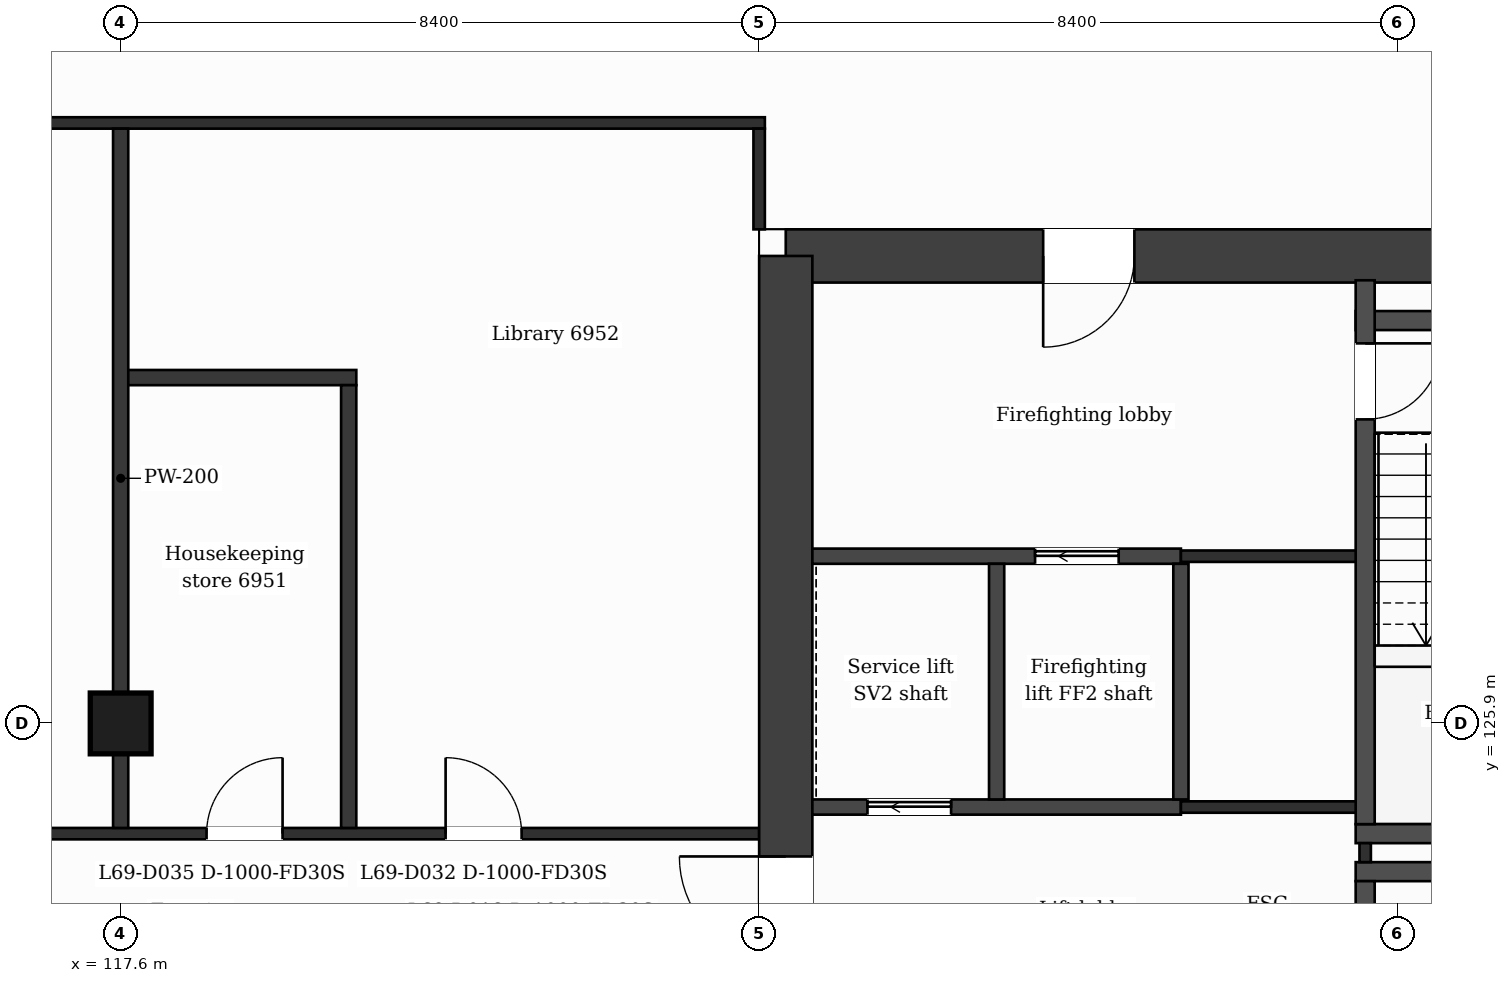
"""IFC4 building model, lengths in metres.
Left out: names, types, materials, properties, quantities, classifications, styles, units other than length and angle.
Written with IfcOpenShell. Run it as: python <this file> out.ifc"""

import sys

from ifc_helpers import new_model, si_unit, direction, frame, frame_2d, origin, origin_2d, place, context, subcontext, project, spatial, rectangle, extrude, element, fill, save


model = new_model("IFC4")
c1 = context("Model", 3, precision=1e-05, world=origin(), true_north=direction((0.0, 1.0)))
c2 = subcontext(c1, "Body", "Model", "MODEL_VIEW")
j1 = project(units=[si_unit("LENGTHUNIT", "METRE"), si_unit("PLANEANGLEUNIT", "RADIAN")], contexts=[c1])
p1 = place(None, origin())
s1 = spatial("IfcSite", under=j1, at=p1, CompositionType="ELEMENT")
p2 = place(p1, origin())
s2 = spatial("IfcBuilding", under=s1, at=p2, CompositionType="ELEMENT")
p3 = place(p2, frame((0.0, 0.0, 284.9)))
s3 = spatial("IfcBuildingStorey", under=s2, at=p3, CompositionType="ELEMENT", Elevation=284.9)
p4 = place(p3, frame((126.35, 132.05, 0.0), z_axis=(0.0, 0.0, 1.0), x_axis=(1.0, 0.0, 0.0)))
e1 = element("IfcWall", 1, at=p4, inside=s3, PredefinedType="SHEAR", context=c2, shape_type="SweptSolid", body=[
    extrude(rectangle(XDim=11.513, YDim=0.7, at=frame_2d((5.757, 0.0))), origin(), (0.0, 0.0, 1.0), 3.7),
])
p5 = place(p4, frame((3.386, 0.0, 0.0)))
e2 = element("IfcOpeningElement", 2, at=p5, cuts=e1, PredefinedType="OPENING", context=c2, shape_type="SweptSolid", body=[
    extrude(rectangle(XDim=1.2, YDim=2.1, at=frame_2d((0.6, 1.05))), frame((0.0, 0.36, 0.0), z_axis=(0.0, -1.0, 0.0), x_axis=(1.0, 0.0, 0.0)), (0.0, 0.0, 1.0), 0.72),
])
p6 = place(p3, frame((126.35, 116.35, 0.0), z_axis=(0.0, 0.0, 1.0), x_axis=(0.0, 1.0, 0.0)))
e3 = element("IfcWall", 3, at=p6, inside=s3, PredefinedType="SHEAR", context=c2, shape_type="SweptSolid", body=[
    extrude(rectangle(XDim=15.7, YDim=0.7, at=frame_2d((7.85, 0.0))), origin(), (0.0, 0.0, 1.0), 3.7),
])
p7 = place(p6, frame((6.4, 0.0, 0.0)))
e4 = element("IfcOpeningElement", 4, at=p7, cuts=e3, PredefinedType="OPENING", context=c2, shape_type="SweptSolid", body=[
    extrude(rectangle(XDim=1.4, YDim=2.1, at=frame_2d((0.7, 1.05))), frame((0.0, 0.36, 0.0), z_axis=(0.0, -1.0, 0.0), x_axis=(1.0, 0.0, 0.0)), (0.0, 0.0, 1.0), 0.72),
])
p8 = place(p3, frame((117.6, 125.9, 0.0), z_axis=(0.0, 0.0, 1.0), x_axis=(1.0, 0.0, 0.0)))
e5 = element("IfcColumn", 5, at=p8, inside=s3, PredefinedType="COLUMN", context=c2, shape_type="SweptSolid", body=[
    extrude(rectangle(XDim=0.8, YDim=0.8, at=origin_2d()), origin(), (0.0, 0.0, 1.0), 3.7),
])
for number, where, z_axis, x_axis in (
    (6, (133.848, 123.95, 0.0), (0.0, 0.0, 1.0), (1.0, 0.0, 0.0)),
    (7, (133.848, 124.45, 0.0), (0.0, 0.0, 1.0), (1.0, 0.0, 0.0)),
):
    element("IfcWall", number, at=place(p3, frame(where, z_axis=z_axis, x_axis=x_axis)), inside=s3, PredefinedType="PARTITIONING", context=c2, shape_type="SweptSolid", body=[
        extrude(rectangle(XDim=3.4, YDim=0.25, at=frame_2d((1.7, 0.0))), origin(), (0.0, 0.0, 1.0), 3.38),
    ])
p9 = place(p3, frame((100.8, 124.45, 0.0), z_axis=(0.0, 0.0, 1.0), x_axis=(1.0, 0.0, 0.0)))
e8 = element("IfcWall", 8, at=p9, inside=s3, PredefinedType="PARTITIONING", context=c2, shape_type="SweptSolid", body=[
    extrude(rectangle(XDim=25.2, YDim=0.15, at=frame_2d((12.6, 0.0))), origin(), (0.0, 0.0, 1.0), 3.38),
])
p10 = place(p9, frame((21.075, 0.0, 0.0)))
e9 = element("IfcOpeningElement", 9, at=p10, cuts=e8, PredefinedType="OPENING", context=c2, shape_type="SweptSolid", body=[
    extrude(rectangle(XDim=1.0, YDim=2.1, at=frame_2d((0.5, 1.05))), frame((0.0, 0.085, 0.0), z_axis=(0.0, -1.0, 0.0), x_axis=(1.0, 0.0, 0.0)), (0.0, 0.0, 1.0), 0.17),
])
p11 = place(p9, frame((5.375, 0.0, 0.0)))
e10 = element("IfcOpeningElement", 10, at=p11, cuts=e8, PredefinedType="OPENING", context=c2, shape_type="SweptSolid", body=[
    extrude(rectangle(XDim=1.0, YDim=2.1, at=frame_2d((0.5, 1.05))), frame((0.0, 0.085, 0.0), z_axis=(0.0, -1.0, 0.0), x_axis=(1.0, 0.0, 0.0)), (0.0, 0.0, 1.0), 0.17),
])
p12 = place(p9, frame((12.1, 0.0, 0.0)))
e11 = element("IfcOpeningElement", 11, at=p12, cuts=e8, PredefinedType="OPENING", context=c2, shape_type="SweptSolid", body=[
    extrude(rectangle(XDim=1.0, YDim=2.1, at=frame_2d((0.5, 1.05))), frame((0.0, 0.085, 0.0), z_axis=(0.0, -1.0, 0.0), x_axis=(1.0, 0.0, 0.0)), (0.0, 0.0, 1.0), 0.17),
])
p13 = place(p9, frame((17.93, 0.0, 0.0)))
e12 = element("IfcOpeningElement", 12, at=p13, cuts=e8, PredefinedType="OPENING", context=c2, shape_type="SweptSolid", body=[
    extrude(rectangle(XDim=1.0, YDim=2.1, at=frame_2d((0.5, 1.05))), frame((0.0, 0.085, 0.0), z_axis=(0.0, -1.0, 0.0), x_axis=(1.0, 0.0, 0.0)), (0.0, 0.0, 1.0), 0.17),
])
p14 = place(p3, frame((126.7, 124.8, 0.0), z_axis=(0.0, 0.0, 1.0), x_axis=(1.0, 0.0, 0.0)))
e13 = element("IfcWall", 13, at=p14, inside=s3, PredefinedType="PARTITIONING", context=c2, shape_type="SweptSolid", body=[
    extrude(rectangle(XDim=4.849, YDim=0.2, at=frame_2d((2.424, 0.0))), origin(), (0.0, 0.0, 1.0), 3.38),
])
p15 = place(p14, frame((0.725, 0.0, 0.0)))
e14 = element("IfcOpeningElement", 14, at=p15, cuts=e13, PredefinedType="OPENING", context=c2, shape_type="SweptSolid", body=[
    extrude(rectangle(XDim=1.1, YDim=2.1, at=frame_2d((0.55, 1.05))), frame((0.0, 0.11, 0.0), z_axis=(0.0, -1.0, 0.0), x_axis=(1.0, 0.0, 0.0)), (0.0, 0.0, 1.0), 0.22),
])
p16 = place(p3, frame((131.549, 124.8, 0.0), z_axis=(0.0, 0.0, 1.0), x_axis=(1.0, 0.0, 0.0)))
e15 = element("IfcWall", 15, at=p16, inside=s3, PredefinedType="PARTITIONING", context=c2, shape_type="SweptSolid", body=[
    extrude(rectangle(XDim=2.549, YDim=0.15, at=frame_2d((1.275, 0.0))), origin(), (0.0, 0.0, 1.0), 3.38),
])
p17 = place(p3, frame((126.7, 128.1, 0.0), z_axis=(0.0, 0.0, 1.0), x_axis=(1.0, 0.0, 0.0)))
e16 = element("IfcWall", 16, at=p17, inside=s3, PredefinedType="PARTITIONING", context=c2, shape_type="SweptSolid", body=[
    extrude(rectangle(XDim=4.849, YDim=0.2, at=frame_2d((2.424, 0.0))), origin(), (0.0, 0.0, 1.0), 3.38),
])
p18 = place(p17, frame((2.93, 0.0, 0.0)))
e17 = element("IfcOpeningElement", 17, at=p18, cuts=e16, PredefinedType="OPENING", context=c2, shape_type="SweptSolid", body=[
    extrude(rectangle(XDim=1.1, YDim=2.1, at=frame_2d((0.55, 1.05))), frame((0.0, 0.11, 0.0), z_axis=(0.0, -1.0, 0.0), x_axis=(1.0, 0.0, 0.0)), (0.0, 0.0, 1.0), 0.22),
])
p19 = place(p3, frame((131.549, 128.1, 0.0), z_axis=(0.0, 0.0, 1.0), x_axis=(1.0, 0.0, 0.0)))
e18 = element("IfcWall", 18, at=p19, inside=s3, PredefinedType="PARTITIONING", context=c2, shape_type="SweptSolid", body=[
    extrude(rectangle(XDim=2.424, YDim=0.15, at=frame_2d((1.212, 0.0))), origin(), (0.0, 0.0, 1.0), 3.38),
])
p20 = place(p3, frame((117.6, 130.45, 0.0), z_axis=(0.0, 0.0, 1.0), x_axis=(1.0, 0.0, 0.0)))
e19 = element("IfcWall", 19, at=p20, inside=s3, PredefinedType="PARTITIONING", context=c2, shape_type="SweptSolid", body=[
    extrude(rectangle(XDim=3.1, YDim=0.2, at=frame_2d((1.55, 0.0))), origin(), (0.0, 0.0, 1.0), 3.38),
])
p21 = place(p3, frame((133.848, 131.2, 0.0), z_axis=(0.0, 0.0, 1.0), x_axis=(1.0, 0.0, 0.0)))
e20 = element("IfcWall", 20, at=p21, inside=s3, PredefinedType="PARTITIONING", context=c2, shape_type="SweptSolid", body=[
    extrude(rectangle(XDim=3.807, YDim=0.25, at=frame_2d((1.903, 0.0))), origin(), (0.0, 0.0, 1.0), 3.38),
])
p22 = place(p3, frame((100.725, 133.8, 0.0), z_axis=(0.0, 0.0, 1.0), x_axis=(1.0, 0.0, 0.0)))
e21 = element("IfcWall", 21, at=p22, inside=s3, PredefinedType="PARTITIONING", context=c2, shape_type="SweptSolid", body=[
    extrude(rectangle(XDim=25.35, YDim=0.15, at=frame_2d((12.675, 0.0))), origin(), (0.0, 0.0, 1.0), 3.38),
])
p23 = place(p3, frame((117.6, 124.525, 0.0), z_axis=(0.0, 0.0, 1.0), x_axis=(0.0, 1.0, 0.0)))
e22 = element("IfcWall", 22, at=p23, inside=s3, PredefinedType="PARTITIONING", context=c2, shape_type="SweptSolid", body=[
    extrude(rectangle(XDim=9.2, YDim=0.2, at=frame_2d((4.6, 0.0))), origin(), (0.0, 0.0, 1.0), 3.38),
])
p24 = place(p3, frame((120.6, 124.525, 0.0), z_axis=(0.0, 0.0, 1.0), x_axis=(0.0, 1.0, 0.0)))
e23 = element("IfcWall", 23, at=p24, inside=s3, PredefinedType="PARTITIONING", context=c2, shape_type="SweptSolid", body=[
    extrude(rectangle(XDim=5.825, YDim=0.2, at=frame_2d((2.913, 0.0))), origin(), (0.0, 0.0, 1.0), 3.38),
])
p25 = place(p3, frame((126.0, 132.4, 0.0), z_axis=(0.0, 0.0, 1.0), x_axis=(0.0, 1.0, 0.0)))
e24 = element("IfcWall", 24, at=p25, inside=s3, PredefinedType="PARTITIONING", context=c2, shape_type="SweptSolid", body=[
    extrude(rectangle(XDim=1.325, YDim=0.15, at=frame_2d((0.663, 0.0))), origin(), (0.0, 0.0, 1.0), 3.38),
])
for number, where, z_axis, x_axis in (
    (25, (129.124, 124.9, 0.0), (0.0, 0.0, 1.0), (0.0, 1.0, 0.0)),
    (26, (131.549, 124.9, 0.0), (0.0, 0.0, 1.0), (0.0, 1.0, 0.0)),
):
    element("IfcWall", number, at=place(p3, frame(where, z_axis=z_axis, x_axis=x_axis)), inside=s3, PredefinedType="PARTITIONING", context=c2, shape_type="SweptSolid", body=[
        extrude(rectangle(XDim=3.1, YDim=0.2, at=frame_2d((1.55, 0.0))), origin(), (0.0, 0.0, 1.0), 3.38),
    ])
p26 = place(p3, frame((133.973, 124.075, 0.0), z_axis=(0.0, 0.0, 1.0), x_axis=(0.0, 1.0, 0.0)))
e27 = element("IfcWall", 27, at=p26, inside=s3, PredefinedType="PARTITIONING", context=c2, shape_type="SweptSolid", body=[
    extrude(rectangle(XDim=0.25, YDim=0.15, at=frame_2d((0.125, 0.0))), origin(), (0.0, 0.0, 1.0), 3.38),
])
p27 = place(p3, frame((133.973, 116.67, 0.0), z_axis=(0.0, 0.0, 1.0), x_axis=(0.0, 1.0, 0.0)))
e28 = element("IfcWall", 28, at=p27, inside=s3, PredefinedType="PARTITIONING", context=c2, shape_type="SweptSolid", body=[
    extrude(rectangle(XDim=7.155, YDim=0.25, at=frame_2d((3.578, 0.0))), origin(), (0.0, 0.0, 1.0), 3.38),
])
p28 = place(p27, frame((5.855, 0.0, 0.0)))
e29 = element("IfcOpeningElement", 29, at=p28, cuts=e28, PredefinedType="OPENING", context=c2, shape_type="SweptSolid", body=[
    extrude(rectangle(XDim=0.95, YDim=2.1, at=frame_2d((0.475, 1.05))), frame((0.0, 0.135, 0.0), z_axis=(0.0, -1.0, 0.0), x_axis=(1.0, 0.0, 0.0)), (0.0, 0.0, 1.0), 0.27),
])
p29 = place(p3, frame((133.973, 124.575, 0.0), z_axis=(0.0, 0.0, 1.0), x_axis=(0.0, 1.0, 0.0)))
e30 = element("IfcWall", 30, at=p29, inside=s3, PredefinedType="PARTITIONING", context=c2, shape_type="SweptSolid", body=[
    extrude(rectangle(XDim=7.155, YDim=0.25, at=frame_2d((3.578, 0.0))), origin(), (0.0, 0.0, 1.0), 3.38),
])
p30 = place(p29, frame((5.325, 0.0, 0.0)))
e31 = element("IfcOpeningElement", 31, at=p30, cuts=e30, PredefinedType="OPENING", context=c2, shape_type="SweptSolid", body=[
    extrude(rectangle(XDim=1.0, YDim=2.1, at=frame_2d((0.5, 1.05))), frame((0.0, 0.135, 0.0), z_axis=(0.0, -1.0, 0.0), x_axis=(1.0, 0.0, 0.0)), (0.0, 0.0, 1.0), 0.27),
])
p31 = place(p18, origin())
e32 = element("IfcDoor", 32, at=p31, inside=s3, OperationType="SLIDING_TO_LEFT", PredefinedType="DOOR", context=c2, shape_type="SweptSolid", body=[
    extrude(rectangle(XDim=1.1, YDim=2.1, at=frame_2d((0.55, 1.05))), frame((0.0, 0.025, 0.0), z_axis=(0.0, -1.0, 0.0), x_axis=(1.0, 0.0, 0.0)), (0.0, 0.0, 1.0), 0.05),
])
fill(e17, e32)
p32 = place(p15, origin())
e33 = element("IfcDoor", 33, at=p32, inside=s3, OperationType="SLIDING_TO_LEFT", PredefinedType="DOOR", context=c2, shape_type="SweptSolid", body=[
    extrude(rectangle(XDim=1.1, YDim=2.1, at=frame_2d((0.55, 1.05))), frame((0.0, 0.025, 0.0), z_axis=(0.0, -1.0, 0.0), x_axis=(1.0, 0.0, 0.0)), (0.0, 0.0, 1.0), 0.05),
])
fill(e14, e33)
p33 = place(p30, origin())
e34 = element("IfcDoor", 34, at=p33, inside=s3, OperationType="SINGLE_SWING_RIGHT", PredefinedType="DOOR", context=c2, shape_type="SweptSolid", body=[
    extrude(rectangle(XDim=1.0, YDim=2.1, at=frame_2d((0.5, 1.05))), frame((0.0, 0.025, 0.0), z_axis=(0.0, -1.0, 0.0), x_axis=(1.0, 0.0, 0.0)), (0.0, 0.0, 1.0), 0.05),
])
fill(e31, e34)
p34 = place(p10, origin())
e35 = element("IfcDoor", 35, at=p34, inside=s3, OperationType="SINGLE_SWING_LEFT", PredefinedType="DOOR", context=c2, shape_type="SweptSolid", body=[
    extrude(rectangle(XDim=1.0, YDim=2.1, at=frame_2d((0.5, 1.05))), frame((0.0, 0.025, 0.0), z_axis=(0.0, -1.0, 0.0), x_axis=(1.0, 0.0, 0.0)), (0.0, 0.0, 1.0), 0.05),
])
fill(e9, e35)
p35 = place(p13, origin())
e36 = element("IfcDoor", 36, at=p35, inside=s3, OperationType="SINGLE_SWING_RIGHT", PredefinedType="DOOR", context=c2, shape_type="SweptSolid", body=[
    extrude(rectangle(XDim=1.0, YDim=2.1, at=frame_2d((0.5, 1.05))), frame((0.0, 0.025, 0.0), z_axis=(0.0, -1.0, 0.0), x_axis=(1.0, 0.0, 0.0)), (0.0, 0.0, 1.0), 0.05),
])
fill(e12, e36)
p36 = place(p5, origin())
e37 = element("IfcDoor", 37, at=p36, inside=s3, OperationType="SINGLE_SWING_LEFT", PredefinedType="DOOR", context=c2, shape_type="SweptSolid", body=[
    extrude(rectangle(XDim=1.2, YDim=2.1, at=frame_2d((0.6, 1.05))), frame((0.0, 0.025, 0.0), z_axis=(0.0, -1.0, 0.0), x_axis=(1.0, 0.0, 0.0)), (0.0, 0.0, 1.0), 0.05),
])
fill(e2, e37)
p37 = place(p7, origin())
e38 = element("IfcDoor", 38, at=p37, inside=s3, OperationType="SINGLE_SWING_RIGHT", PredefinedType="DOOR", context=c2, shape_type="SweptSolid", body=[
    extrude(rectangle(XDim=1.4, YDim=2.1, at=frame_2d((0.7, 1.05))), frame((0.0, 0.025, 0.0), z_axis=(0.0, -1.0, 0.0), x_axis=(1.0, 0.0, 0.0)), (0.0, 0.0, 1.0), 0.05),
])
fill(e4, e38)
save(model, sys.argv[1])
